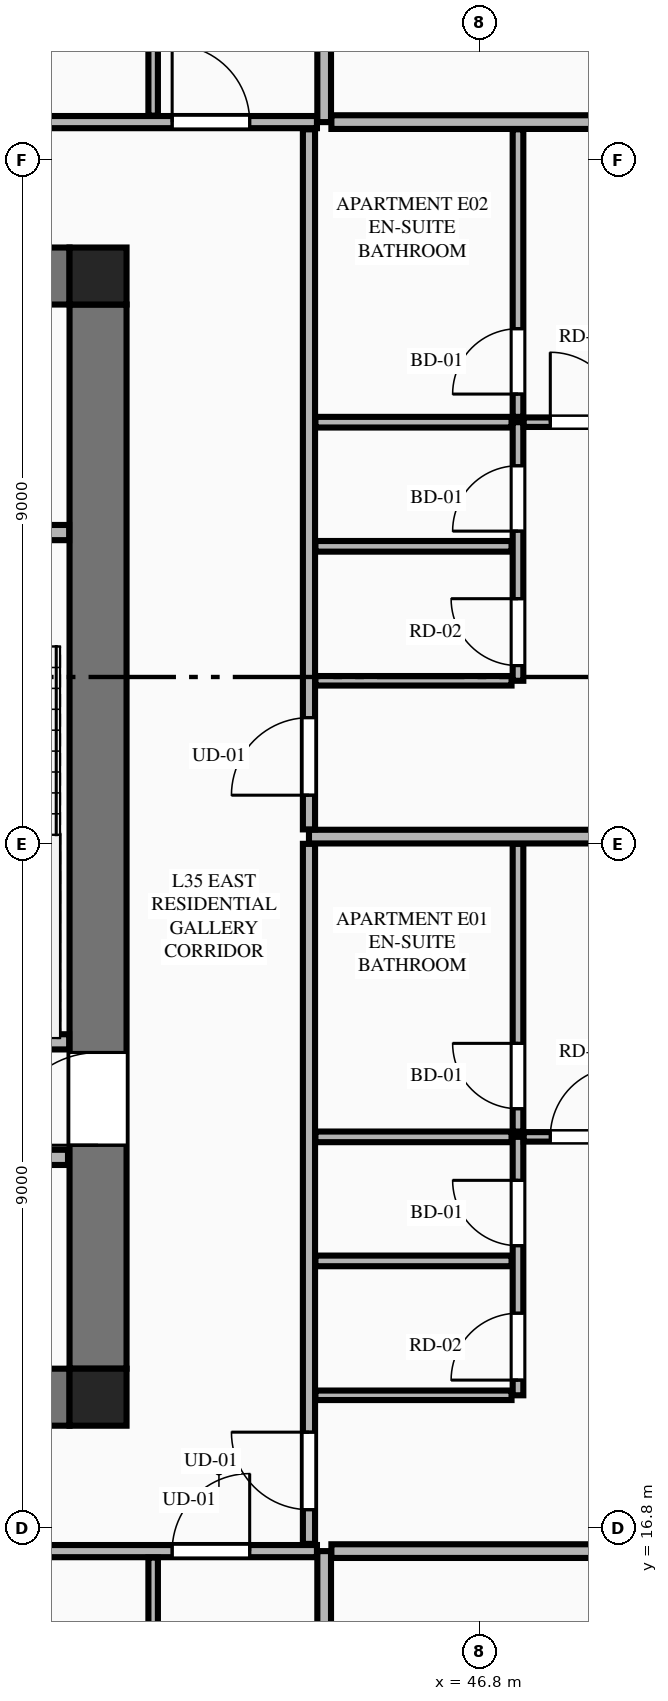
"""IFC4 building model, lengths in metres.
Left out: names, types, materials, properties, quantities, classifications, styles, units other than length and angle.
Written with IfcOpenShell. Run it as: python <this file> out.ifc"""

import sys

from ifc_helpers import new_model, si_unit, direction, frame, frame_2d, origin, origin_2d, place, context, subcontext, project, spatial, rectangle, extrude, element, fill, save


model = new_model("IFC4")
c1 = context("Model", 3, precision=1e-05, world=origin(), true_north=direction((0.0, 1.0)))
c2 = subcontext(c1, "Body", "Model", "MODEL_VIEW")
j1 = project(units=[si_unit("LENGTHUNIT", "METRE"), si_unit("PLANEANGLEUNIT", "RADIAN")], contexts=[c1])
p1 = place(None, origin())
s1 = spatial("IfcSite", under=j1, at=p1, CompositionType="ELEMENT")
p2 = place(p1, origin())
s2 = spatial("IfcBuilding", under=s1, at=p2, CompositionType="ELEMENT")
p3 = place(p2, frame((0.0, 0.0, 133.9)))
s3 = spatial("IfcBuildingStorey", under=s2, at=p3, CompositionType="ELEMENT", Elevation=133.9)
for number, where, z_axis, x_axis in (
    (1, (41.775, 18.525, 0.0), (0.0, 0.0, 1.0), (1.0, 0.0, 0.0)),
    (2, (41.775, 33.275, 0.0), (0.0, 0.0, 1.0), (1.0, 0.0, 0.0)),
):
    element("IfcColumn", number, at=place(p3, frame(where, z_axis=z_axis, x_axis=x_axis)), inside=s3, PredefinedType="COLUMN", context=c2, shape_type="SweptSolid", body=[
        extrude(rectangle(XDim=0.75, YDim=0.75, at=origin_2d()), origin(), (0.0, 0.0, 1.0), 3.55),
    ])
for number, where, z_axis, x_axis in (
    (3, (23.4, 18.525, 0.0), (0.0, 0.0, 1.0), (1.0, 0.0, 0.0)),
    (4, (23.4, 33.275, 0.0), (0.0, 0.0, 1.0), (1.0, 0.0, 0.0)),
):
    element("IfcWall", number, at=place(p3, frame(where, z_axis=z_axis, x_axis=x_axis)), inside=s3, PredefinedType="SHEAR", context=c2, shape_type="SweptSolid", body=[
        extrude(rectangle(XDim=18.0, YDim=0.75, at=frame_2d((9.0, 0.0))), origin(), (0.0, 0.0, 1.0), 3.34),
    ])
p4 = place(p3, frame((41.775, 18.9, 0.0), z_axis=(0.0, 0.0, 1.0), x_axis=(0.0, 1.0, 0.0)))
e5 = element("IfcWall", 5, at=p4, inside=s3, PredefinedType="SHEAR", context=c2, shape_type="SweptSolid", body=[
    extrude(rectangle(XDim=14.0, YDim=0.75, at=frame_2d((7.0, 0.0))), origin(), (0.0, 0.0, 1.0), 3.34),
])
p5 = place(p4, frame((2.94, 0.0, 0.0)))
e6 = element("IfcOpeningElement", 6, at=p5, cuts=e5, PredefinedType="OPENING", context=c2, shape_type="SweptSolid", body=[
    extrude(rectangle(XDim=1.22, YDim=2.25, at=frame_2d((0.61, 1.125))), frame((0.0, 0.385, 0.0), z_axis=(0.0, -1.0, 0.0), x_axis=(1.0, 0.0, 0.0)), (0.0, 0.0, 1.0), 0.77),
])
p6 = place(p3, frame((38.125, 23.2, 0.0), z_axis=(0.0, 0.0, 1.0), x_axis=(1.0, 0.0, 0.0)))
e7 = element("IfcWall", 7, at=p6, inside=s3, PredefinedType="PLUMBINGWALL", context=c2, shape_type="SweptSolid", body=[
    extrude(rectangle(XDim=3.27, YDim=0.2, at=frame_2d((1.635, 0.0))), origin(), (0.0, 0.0, 1.0), 3.34),
])
p7 = place(p3, frame((38.125, 29.9, 0.0), z_axis=(0.0, 0.0, 1.0), x_axis=(1.0, 0.0, 0.0)))
e8 = element("IfcWall", 8, at=p7, inside=s3, PredefinedType="PLUMBINGWALL", context=c2, shape_type="SweptSolid", body=[
    extrude(rectangle(XDim=3.27, YDim=0.2, at=frame_2d((1.635, 0.0))), origin(), (0.0, 0.0, 1.0), 3.34),
])
p8 = place(p7, frame((0.5, 0.0, 0.0)))
e9 = element("IfcOpeningElement", 9, at=p8, cuts=e8, PredefinedType="OPENING", context=c2, shape_type="SweptSolid", body=[
    extrude(rectangle(XDim=0.85, YDim=2.05, at=frame_2d((0.425, 1.025))), frame((0.0, 0.11, 0.0), z_axis=(0.0, -1.0, 0.0), x_axis=(1.0, 0.0, 0.0)), (0.0, 0.0, 1.0), 0.22),
])
p9 = place(p3, frame((23.42, 21.68, 0.0), z_axis=(0.0, 0.0, 1.0), x_axis=(1.0, 0.0, 0.0)))
e10 = element("IfcWall", 10, at=p9, inside=s3, PredefinedType="PLUMBINGWALL", context=c2, shape_type="SweptSolid", body=[
    extrude(rectangle(XDim=17.96, YDim=0.2, at=frame_2d((8.98, 0.0))), origin(), (0.0, 0.0, 1.0), 3.34),
])
p10 = place(p9, frame((11.6, 0.0, 0.0)))
e11 = element("IfcOpeningElement", 11, at=p10, cuts=e10, PredefinedType="OPENING", context=c2, shape_type="SweptSolid", body=[
    extrude(rectangle(XDim=1.1, YDim=2.2, at=frame_2d((0.55, 1.1))), frame((0.0, 0.11, 0.0), z_axis=(0.0, -1.0, 0.0), x_axis=(1.0, 0.0, 0.0)), (0.0, 0.0, 1.0), 0.22),
])
p11 = place(p9, frame((0.41, 0.0, 0.0)))
e12 = element("IfcOpeningElement", 12, at=p11, cuts=e10, PredefinedType="OPENING", context=c2, shape_type="SweptSolid", body=[
    extrude(rectangle(XDim=0.85, YDim=2.05, at=frame_2d((0.425, 1.025))), frame((0.0, 0.11, 0.0), z_axis=(0.0, -1.0, 0.0), x_axis=(1.0, 0.0, 0.0)), (0.0, 0.0, 1.0), 0.22),
])
p12 = place(p9, frame((13.78, 0.0, 0.0)))
e13 = element("IfcOpeningElement", 13, at=p12, cuts=e10, PredefinedType="OPENING", context=c2, shape_type="SweptSolid", body=[
    extrude(rectangle(XDim=0.85, YDim=2.05, at=frame_2d((0.425, 1.025))), frame((0.0, 0.11, 0.0), z_axis=(0.0, -1.0, 0.0), x_axis=(1.0, 0.0, 0.0)), (0.0, 0.0, 1.0), 0.22),
])
p13 = place(p9, frame((16.13, 0.0, 0.0)))
e14 = element("IfcOpeningElement", 14, at=p13, cuts=e10, PredefinedType="OPENING", context=c2, shape_type="SweptSolid", body=[
    extrude(rectangle(XDim=0.85, YDim=2.05, at=frame_2d((0.425, 1.025))), frame((0.0, 0.11, 0.0), z_axis=(0.0, -1.0, 0.0), x_axis=(1.0, 0.0, 0.0)), (0.0, 0.0, 1.0), 0.22),
])
p14 = place(p3, frame((44.75, 4.105, 0.0), z_axis=(0.0, 0.0, 1.0), x_axis=(0.0, 1.0, 0.0)))
e15 = element("IfcWall", 15, at=p14, inside=s3, PredefinedType="PARTITIONING", context=c2, shape_type="SweptSolid", body=[
    extrude(rectangle(XDim=12.395, YDim=0.18, at=frame_2d((6.198, 0.0))), origin(), (0.0, 0.0, 1.0), 3.34),
])
p15 = place(p3, frame((28.663, 16.5, 0.0), z_axis=(0.0, 0.0, 1.0), x_axis=(1.0, 0.0, 0.0)))
e16 = element("IfcWall", 16, at=p15, inside=s3, PredefinedType="PARTITIONING", context=c2, shape_type="SweptSolid", body=[
    extrude(rectangle(XDim=15.992, YDim=0.16, at=frame_2d((7.996, 0.0))), origin(), (0.0, 0.0, 1.0), 3.34),
])
p16 = place(p15, frame((14.087, 0.0, 0.0)))
e17 = element("IfcOpeningElement", 17, at=p16, cuts=e16, PredefinedType="OPENING", context=c2, shape_type="SweptSolid", body=[
    extrude(rectangle(XDim=1.02, YDim=2.25, at=frame_2d((0.51, 1.125))), frame((0.0, 0.09, 0.0), z_axis=(0.0, -1.0, 0.0), x_axis=(1.0, 0.0, 0.0)), (0.0, 0.0, 1.0), 0.18),
])
p17 = place(p3, frame((42.5, 12.887, 0.0), z_axis=(0.0, 0.0, 1.0), x_axis=(0.0, 1.0, 0.0)))
e18 = element("IfcWall", 18, at=p17, inside=s3, PredefinedType="PARTITIONING", context=c2, shape_type="SweptSolid", body=[
    extrude(rectangle(XDim=3.528, YDim=0.125, at=frame_2d((1.764, 0.0))), origin(), (0.0, 0.0, 1.0), 2.722),
])
p18 = place(p3, frame((44.75, 35.3, 0.0), z_axis=(0.0, 0.0, 1.0), x_axis=(0.0, 1.0, 0.0)))
e19 = element("IfcWall", 19, at=p18, inside=s3, PredefinedType="PARTITIONING", context=c2, shape_type="SweptSolid", body=[
    extrude(rectangle(XDim=12.195, YDim=0.18, at=frame_2d((6.098, 0.0))), origin(), (0.0, 0.0, 1.0), 3.34),
])
p19 = place(p3, frame((28.663, 35.3, 0.0), z_axis=(0.0, 0.0, 1.0), x_axis=(1.0, 0.0, 0.0)))
e20 = element("IfcWall", 20, at=p19, inside=s3, PredefinedType="PARTITIONING", context=c2, shape_type="SweptSolid", body=[
    extrude(rectangle(XDim=15.992, YDim=0.16, at=frame_2d((7.996, 0.0))), origin(), (0.0, 0.0, 1.0), 3.34),
])
p20 = place(p19, frame((14.087, 0.0, 0.0)))
e21 = element("IfcOpeningElement", 21, at=p20, cuts=e20, PredefinedType="OPENING", context=c2, shape_type="SweptSolid", body=[
    extrude(rectangle(XDim=1.02, YDim=2.25, at=frame_2d((0.51, 1.125))), frame((0.0, 0.09, 0.0), z_axis=(0.0, -1.0, 0.0), x_axis=(1.0, 0.0, 0.0)), (0.0, 0.0, 1.0), 0.18),
])
p21 = place(p3, frame((42.5, 35.385, 0.0), z_axis=(0.0, 0.0, 1.0), x_axis=(0.0, 1.0, 0.0)))
e22 = element("IfcWall", 22, at=p21, inside=s3, PredefinedType="PARTITIONING", context=c2, shape_type="SweptSolid", body=[
    extrude(rectangle(XDim=6.151, YDim=0.125, at=frame_2d((3.075, 0.0))), origin(), (0.0, 0.0, 1.0), 2.722),
])
p22 = place(p3, frame((44.845, 16.5, 0.0), z_axis=(0.0, 0.0, 1.0), x_axis=(1.0, 0.0, 0.0)))
e23 = element("IfcWall", 23, at=p22, inside=s3, PredefinedType="PARTITIONING", context=c2, shape_type="SweptSolid", body=[
    extrude(rectangle(XDim=7.77, YDim=0.18, at=frame_2d((3.885, 0.0))), origin(), (0.0, 0.0, 1.0), 3.34),
])
p23 = place(p3, frame((44.845, 35.3, 0.0), z_axis=(0.0, 0.0, 1.0), x_axis=(1.0, 0.0, 0.0)))
e24 = element("IfcWall", 24, at=p23, inside=s3, PredefinedType="PARTITIONING", context=c2, shape_type="SweptSolid", body=[
    extrude(rectangle(XDim=7.669, YDim=0.18, at=frame_2d((3.834, 0.0))), origin(), (0.0, 0.0, 1.0), 3.34),
])
p24 = place(p3, frame((44.55, 16.595, 0.0), z_axis=(0.0, 0.0, 1.0), x_axis=(0.0, 1.0, 0.0)))
e25 = element("IfcWall", 25, at=p24, inside=s3, PredefinedType="PARTITIONING", context=c2, shape_type="SweptSolid", body=[
    extrude(rectangle(XDim=9.21, YDim=0.16, at=frame_2d((4.605, 0.0))), origin(), (0.0, 0.0, 1.0), 3.34),
])
p25 = place(p24, frame((0.45, 0.0, 0.0)))
e26 = element("IfcOpeningElement", 26, at=p25, cuts=e25, PredefinedType="OPENING", context=c2, shape_type="SweptSolid", body=[
    extrude(rectangle(XDim=1.02, YDim=2.25, at=frame_2d((0.51, 1.125))), frame((0.0, 0.09, 0.0), z_axis=(0.0, -1.0, 0.0), x_axis=(1.0, 0.0, 0.0)), (0.0, 0.0, 1.0), 0.18),
])
p26 = place(p3, frame((44.635, 18.55, 0.0), z_axis=(0.0, 0.0, 1.0), x_axis=(1.0, 0.0, 0.0)))
e27 = element("IfcWall", 27, at=p26, inside=s3, PredefinedType="PARTITIONING", context=c2, shape_type="SweptSolid", body=[
    extrude(rectangle(XDim=2.58, YDim=0.125, at=frame_2d((1.29, 0.0))), origin(), (0.0, 0.0, 1.0), 2.722),
])
p27 = place(p3, frame((47.3, 18.55, 0.0), z_axis=(0.0, 0.0, 1.0), x_axis=(0.0, 1.0, 0.0)))
e28 = element("IfcWall", 28, at=p27, inside=s3, PredefinedType="PLUMBINGWALL", context=c2, shape_type="SweptSolid", body=[
    extrude(rectangle(XDim=3.4, YDim=0.14, at=frame_2d((1.7, 0.0))), origin(), (0.0, 0.0, 1.0), 3.34),
])
p28 = place(p27, frame((0.2, 0.0, 0.0)))
e29 = element("IfcOpeningElement", 29, at=p28, cuts=e28, PredefinedType="OPENING", context=c2, shape_type="SweptSolid", body=[
    extrude(rectangle(XDim=0.88, YDim=2.15, at=frame_2d((0.44, 1.075))), frame((0.0, 0.08, 0.0), z_axis=(0.0, -1.0, 0.0), x_axis=(1.0, 0.0, 0.0)), (0.0, 0.0, 1.0), 0.16),
])
p29 = place(p27, frame((1.968, 0.0, 0.0)))
e30 = element("IfcOpeningElement", 30, at=p29, cuts=e28, PredefinedType="OPENING", context=c2, shape_type="SweptSolid", body=[
    extrude(rectangle(XDim=0.86, YDim=2.1, at=frame_2d((0.43, 1.05))), frame((0.0, 0.08, 0.0), z_axis=(0.0, -1.0, 0.0), x_axis=(1.0, 0.0, 0.0)), (0.0, 0.0, 1.0), 0.16),
])
p30 = place(p3, frame((47.3, 22.02, 0.0), z_axis=(0.0, 0.0, 1.0), x_axis=(0.0, 1.0, 0.0)))
e31 = element("IfcWall", 31, at=p30, inside=s3, PredefinedType="PLUMBINGWALL", context=c2, shape_type="SweptSolid", body=[
    extrude(rectangle(XDim=3.785, YDim=0.14, at=frame_2d((1.893, 0.0))), origin(), (0.0, 0.0, 1.0), 3.34),
])
p31 = place(p30, frame((0.3, 0.0, 0.0)))
e32 = element("IfcOpeningElement", 32, at=p31, cuts=e31, PredefinedType="OPENING", context=c2, shape_type="SweptSolid", body=[
    extrude(rectangle(XDim=0.86, YDim=2.1, at=frame_2d((0.43, 1.05))), frame((0.0, 0.08, 0.0), z_axis=(0.0, -1.0, 0.0), x_axis=(1.0, 0.0, 0.0)), (0.0, 0.0, 1.0), 0.16),
])
p32 = place(p3, frame((44.635, 21.95, 0.0), z_axis=(0.0, 0.0, 1.0), x_axis=(1.0, 0.0, 0.0)))
e33 = element("IfcWall", 33, at=p32, inside=s3, PredefinedType="PLUMBINGWALL", context=c2, shape_type="SweptSolid", body=[
    extrude(rectangle(XDim=2.58, YDim=0.14, at=frame_2d((1.29, 0.0))), origin(), (0.0, 0.0, 1.0), 3.34),
])
p33 = place(p3, frame((47.375, 21.95, 0.0), z_axis=(0.0, 0.0, 1.0), x_axis=(1.0, 0.0, 0.0)))
e34 = element("IfcWall", 34, at=p33, inside=s3, PredefinedType="PARTITIONING", context=c2, shape_type="SweptSolid", body=[
    extrude(rectangle(XDim=8.013, YDim=0.125, at=frame_2d((4.006, 0.0))), origin(), (0.0, 0.0, 1.0), 3.34),
])
p34 = place(p33, frame((0.35, 0.0, 0.0)))
e35 = element("IfcOpeningElement", 35, at=p34, cuts=e34, PredefinedType="OPENING", context=c2, shape_type="SweptSolid", body=[
    extrude(rectangle(XDim=0.92, YDim=2.15, at=frame_2d((0.46, 1.075))), frame((0.0, 0.073, 0.0), z_axis=(0.0, -1.0, 0.0), x_axis=(1.0, 0.0, 0.0)), (0.0, 0.0, 1.0), 0.145),
])
p35 = place(p3, frame((44.635, 20.318, 0.0), z_axis=(0.0, 0.0, 1.0), x_axis=(1.0, 0.0, 0.0)))
e36 = element("IfcWall", 36, at=p35, inside=s3, PredefinedType="PLUMBINGWALL", context=c2, shape_type="SweptSolid", body=[
    extrude(rectangle(XDim=2.58, YDim=0.14, at=frame_2d((1.29, 0.0))), origin(), (0.0, 0.0, 1.0), 3.34),
])
p36 = place(p3, frame((44.55, 25.9, 0.0), z_axis=(0.0, 0.0, 1.0), x_axis=(1.0, 0.0, 0.0)))
e37 = element("IfcWall", 37, at=p36, inside=s3, PredefinedType="PARTITIONING", context=c2, shape_type="SweptSolid", body=[
    extrude(rectangle(XDim=12.308, YDim=0.18, at=frame_2d((6.154, 0.0))), origin(), (0.0, 0.0, 1.0), 3.34),
])
p37 = place(p3, frame((44.55, 25.995, 0.0), z_axis=(0.0, 0.0, 1.0), x_axis=(0.0, 1.0, 0.0)))
e38 = element("IfcWall", 38, at=p37, inside=s3, PredefinedType="PARTITIONING", context=c2, shape_type="SweptSolid", body=[
    extrude(rectangle(XDim=9.21, YDim=0.16, at=frame_2d((4.605, 0.0))), origin(), (0.0, 0.0, 1.0), 3.34),
])
p38 = place(p37, frame((0.45, 0.0, 0.0)))
e39 = element("IfcOpeningElement", 39, at=p38, cuts=e38, PredefinedType="OPENING", context=c2, shape_type="SweptSolid", body=[
    extrude(rectangle(XDim=1.02, YDim=2.25, at=frame_2d((0.51, 1.125))), frame((0.0, 0.09, 0.0), z_axis=(0.0, -1.0, 0.0), x_axis=(1.0, 0.0, 0.0)), (0.0, 0.0, 1.0), 0.18),
])
p39 = place(p3, frame((44.635, 27.95, 0.0), z_axis=(0.0, 0.0, 1.0), x_axis=(1.0, 0.0, 0.0)))
e40 = element("IfcWall", 40, at=p39, inside=s3, PredefinedType="PARTITIONING", context=c2, shape_type="SweptSolid", body=[
    extrude(rectangle(XDim=2.58, YDim=0.125, at=frame_2d((1.29, 0.0))), origin(), (0.0, 0.0, 1.0), 3.34),
])
p40 = place(p3, frame((47.3, 27.95, 0.0), z_axis=(0.0, 0.0, 1.0), x_axis=(0.0, 1.0, 0.0)))
e41 = element("IfcWall", 41, at=p40, inside=s3, PredefinedType="PLUMBINGWALL", context=c2, shape_type="SweptSolid", body=[
    extrude(rectangle(XDim=3.402, YDim=0.14, at=frame_2d((1.701, 0.0))), origin(), (0.0, 0.0, 1.0), 3.34),
])
p41 = place(p40, frame((0.2, 0.0, 0.0)))
e42 = element("IfcOpeningElement", 42, at=p41, cuts=e41, PredefinedType="OPENING", context=c2, shape_type="SweptSolid", body=[
    extrude(rectangle(XDim=0.88, YDim=2.15, at=frame_2d((0.44, 1.075))), frame((0.0, 0.08, 0.0), z_axis=(0.0, -1.0, 0.0), x_axis=(1.0, 0.0, 0.0)), (0.0, 0.0, 1.0), 0.16),
])
p42 = place(p40, frame((1.969, 0.0, 0.0)))
e43 = element("IfcOpeningElement", 43, at=p42, cuts=e41, PredefinedType="OPENING", context=c2, shape_type="SweptSolid", body=[
    extrude(rectangle(XDim=0.86, YDim=2.1, at=frame_2d((0.43, 1.05))), frame((0.0, 0.08, 0.0), z_axis=(0.0, -1.0, 0.0), x_axis=(1.0, 0.0, 0.0)), (0.0, 0.0, 1.0), 0.16),
])
p43 = place(p3, frame((47.3, 31.422, 0.0), z_axis=(0.0, 0.0, 1.0), x_axis=(0.0, 1.0, 0.0)))
e44 = element("IfcWall", 44, at=p43, inside=s3, PredefinedType="PLUMBINGWALL", context=c2, shape_type="SweptSolid", body=[
    extrude(rectangle(XDim=3.783, YDim=0.14, at=frame_2d((1.892, 0.0))), origin(), (0.0, 0.0, 1.0), 3.34),
])
p44 = place(p43, frame((0.3, 0.0, 0.0)))
e45 = element("IfcOpeningElement", 45, at=p44, cuts=e44, PredefinedType="OPENING", context=c2, shape_type="SweptSolid", body=[
    extrude(rectangle(XDim=0.86, YDim=2.1, at=frame_2d((0.43, 1.05))), frame((0.0, 0.08, 0.0), z_axis=(0.0, -1.0, 0.0), x_axis=(1.0, 0.0, 0.0)), (0.0, 0.0, 1.0), 0.16),
])
p45 = place(p3, frame((44.635, 31.352, 0.0), z_axis=(0.0, 0.0, 1.0), x_axis=(1.0, 0.0, 0.0)))
e46 = element("IfcWall", 46, at=p45, inside=s3, PredefinedType="PLUMBINGWALL", context=c2, shape_type="SweptSolid", body=[
    extrude(rectangle(XDim=2.58, YDim=0.14, at=frame_2d((1.29, 0.0))), origin(), (0.0, 0.0, 1.0), 3.34),
])
p46 = place(p3, frame((47.375, 31.352, 0.0), z_axis=(0.0, 0.0, 1.0), x_axis=(1.0, 0.0, 0.0)))
e47 = element("IfcWall", 47, at=p46, inside=s3, PredefinedType="PARTITIONING", context=c2, shape_type="SweptSolid", body=[
    extrude(rectangle(XDim=7.152, YDim=0.125, at=frame_2d((3.576, 0.0))), origin(), (0.0, 0.0, 1.0), 3.34),
])
p47 = place(p46, frame((0.35, 0.0, 0.0)))
e48 = element("IfcOpeningElement", 48, at=p47, cuts=e47, PredefinedType="OPENING", context=c2, shape_type="SweptSolid", body=[
    extrude(rectangle(XDim=0.92, YDim=2.15, at=frame_2d((0.46, 1.075))), frame((0.0, 0.073, 0.0), z_axis=(0.0, -1.0, 0.0), x_axis=(1.0, 0.0, 0.0)), (0.0, 0.0, 1.0), 0.145),
])
p48 = place(p3, frame((44.635, 29.719, 0.0), z_axis=(0.0, 0.0, 1.0), x_axis=(1.0, 0.0, 0.0)))
e49 = element("IfcWall", 49, at=p48, inside=s3, PredefinedType="PLUMBINGWALL", context=c2, shape_type="SweptSolid", body=[
    extrude(rectangle(XDim=2.58, YDim=0.14, at=frame_2d((1.29, 0.0))), origin(), (0.0, 0.0, 1.0), 3.34),
])
p49 = place(p5, origin())
e50 = element("IfcDoor", 50, at=p49, inside=s3, OperationType="SINGLE_SWING_LEFT", PredefinedType="DOOR", context=c2, shape_type="SweptSolid", body=[
    extrude(rectangle(XDim=1.22, YDim=2.25, at=frame_2d((0.61, 1.125))), frame((0.0, 0.025, 0.0), z_axis=(0.0, -1.0, 0.0), x_axis=(1.0, 0.0, 0.0)), (0.0, 0.0, 1.0), 0.05),
])
fill(e6, e50)
p50 = place(p16, origin())
e51 = element("IfcDoor", 51, at=p50, inside=s3, OperationType="SINGLE_SWING_RIGHT", PredefinedType="DOOR", context=c2, shape_type="SweptSolid", body=[
    extrude(rectangle(XDim=1.02, YDim=2.25, at=frame_2d((0.51, 1.125))), frame((0.0, 0.025, 0.0), z_axis=(0.0, -1.0, 0.0), x_axis=(1.0, 0.0, 0.0)), (0.0, 0.0, 1.0), 0.05),
])
fill(e17, e51)
p51 = place(p20, origin())
e52 = element("IfcDoor", 52, at=p51, inside=s3, OperationType="SINGLE_SWING_LEFT", PredefinedType="DOOR", context=c2, shape_type="SweptSolid", body=[
    extrude(rectangle(XDim=1.02, YDim=2.25, at=frame_2d((0.51, 1.125))), frame((0.0, 0.025, 0.0), z_axis=(0.0, -1.0, 0.0), x_axis=(1.0, 0.0, 0.0)), (0.0, 0.0, 1.0), 0.05),
])
fill(e21, e52)
p52 = place(p28, origin())
e53 = element("IfcDoor", 53, at=p52, inside=s3, OperationType="SINGLE_SWING_LEFT", PredefinedType="DOOR", context=c2, shape_type="SweptSolid", body=[
    extrude(rectangle(XDim=0.88, YDim=2.15, at=frame_2d((0.44, 1.075))), frame((0.0, 0.025, 0.0), z_axis=(0.0, -1.0, 0.0), x_axis=(1.0, 0.0, 0.0)), (0.0, 0.0, 1.0), 0.05),
])
fill(e29, e53)
p53 = place(p29, origin())
e54 = element("IfcDoor", 54, at=p53, inside=s3, OperationType="SINGLE_SWING_RIGHT", PredefinedType="DOOR", context=c2, shape_type="SweptSolid", body=[
    extrude(rectangle(XDim=0.86, YDim=2.1, at=frame_2d((0.43, 1.05))), frame((0.0, 0.025, 0.0), z_axis=(0.0, -1.0, 0.0), x_axis=(1.0, 0.0, 0.0)), (0.0, 0.0, 1.0), 0.05),
])
fill(e30, e54)
p54 = place(p31, origin())
e55 = element("IfcDoor", 55, at=p54, inside=s3, OperationType="SINGLE_SWING_RIGHT", PredefinedType="DOOR", context=c2, shape_type="SweptSolid", body=[
    extrude(rectangle(XDim=0.86, YDim=2.1, at=frame_2d((0.43, 1.05))), frame((0.0, 0.025, 0.0), z_axis=(0.0, -1.0, 0.0), x_axis=(1.0, 0.0, 0.0)), (0.0, 0.0, 1.0), 0.05),
])
fill(e32, e55)
p55 = place(p25, origin())
e56 = element("IfcDoor", 56, at=p55, inside=s3, OperationType="SINGLE_SWING_RIGHT", PredefinedType="DOOR", context=c2, shape_type="SweptSolid", body=[
    extrude(rectangle(XDim=1.02, YDim=2.25, at=frame_2d((0.51, 1.125))), frame((0.0, 0.025, 0.0), z_axis=(0.0, -1.0, 0.0), x_axis=(1.0, 0.0, 0.0)), (0.0, 0.0, 1.0), 0.05),
])
fill(e26, e56)
p56 = place(p34, origin())
e57 = element("IfcDoor", 57, at=p56, inside=s3, OperationType="SINGLE_SWING_RIGHT", PredefinedType="DOOR", context=c2, shape_type="SweptSolid", body=[
    extrude(rectangle(XDim=0.92, YDim=2.15, at=frame_2d((0.46, 1.075))), frame((0.0, 0.025, 0.0), z_axis=(0.0, -1.0, 0.0), x_axis=(1.0, 0.0, 0.0)), (0.0, 0.0, 1.0), 0.05),
])
fill(e35, e57)
p57 = place(p41, origin())
e58 = element("IfcDoor", 58, at=p57, inside=s3, OperationType="SINGLE_SWING_RIGHT", PredefinedType="DOOR", context=c2, shape_type="SweptSolid", body=[
    extrude(rectangle(XDim=0.88, YDim=2.15, at=frame_2d((0.44, 1.075))), frame((0.0, 0.025, 0.0), z_axis=(0.0, -1.0, 0.0), x_axis=(1.0, 0.0, 0.0)), (0.0, 0.0, 1.0), 0.05),
])
fill(e42, e58)
p58 = place(p42, origin())
e59 = element("IfcDoor", 59, at=p58, inside=s3, OperationType="SINGLE_SWING_LEFT", PredefinedType="DOOR", context=c2, shape_type="SweptSolid", body=[
    extrude(rectangle(XDim=0.86, YDim=2.1, at=frame_2d((0.43, 1.05))), frame((0.0, 0.025, 0.0), z_axis=(0.0, -1.0, 0.0), x_axis=(1.0, 0.0, 0.0)), (0.0, 0.0, 1.0), 0.05),
])
fill(e43, e59)
p59 = place(p44, origin())
e60 = element("IfcDoor", 60, at=p59, inside=s3, OperationType="SINGLE_SWING_LEFT", PredefinedType="DOOR", context=c2, shape_type="SweptSolid", body=[
    extrude(rectangle(XDim=0.86, YDim=2.1, at=frame_2d((0.43, 1.05))), frame((0.0, 0.025, 0.0), z_axis=(0.0, -1.0, 0.0), x_axis=(1.0, 0.0, 0.0)), (0.0, 0.0, 1.0), 0.05),
])
fill(e45, e60)
p60 = place(p38, origin())
e61 = element("IfcDoor", 61, at=p60, inside=s3, OperationType="SINGLE_SWING_LEFT", PredefinedType="DOOR", context=c2, shape_type="SweptSolid", body=[
    extrude(rectangle(XDim=1.02, YDim=2.25, at=frame_2d((0.51, 1.125))), frame((0.0, 0.025, 0.0), z_axis=(0.0, -1.0, 0.0), x_axis=(1.0, 0.0, 0.0)), (0.0, 0.0, 1.0), 0.05),
])
fill(e39, e61)
p61 = place(p47, origin())
e62 = element("IfcDoor", 62, at=p61, inside=s3, OperationType="SINGLE_SWING_LEFT", PredefinedType="DOOR", context=c2, shape_type="SweptSolid", body=[
    extrude(rectangle(XDim=0.92, YDim=2.15, at=frame_2d((0.46, 1.075))), frame((0.0, 0.025, 0.0), z_axis=(0.0, -1.0, 0.0), x_axis=(1.0, 0.0, 0.0)), (0.0, 0.0, 1.0), 0.05),
])
fill(e48, e62)
save(model, sys.argv[1])
